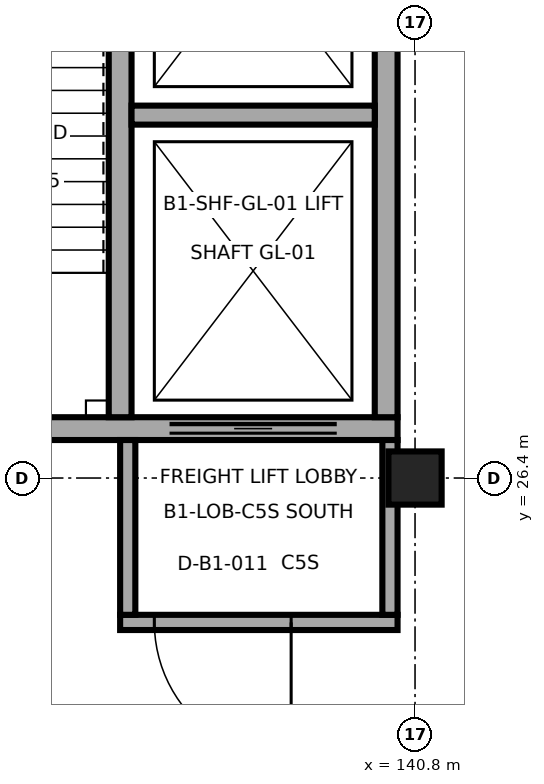
"""IFC4 building model, lengths in metres.
Left out: names, types, materials, properties, quantities, classifications, styles, units other than length and angle.
Written with IfcOpenShell. Run it as: python <this file> out.ifc"""

import sys

from ifc_helpers import new_model, si_unit, direction, frame, frame_2d, origin, origin_2d, place, context, subcontext, project, spatial, rectangle, extrude, element, fill, save


model = new_model("IFC4")
c1 = context("Model", 3, precision=1e-05, world=origin(), true_north=direction((0.0, 1.0)))
c2 = subcontext(c1, "Body", "Model", "MODEL_VIEW")
j1 = project(units=[si_unit("LENGTHUNIT", "METRE"), si_unit("PLANEANGLEUNIT", "RADIAN")], contexts=[c1])
p1 = place(None, origin())
s1 = spatial("IfcSite", under=j1, at=p1, CompositionType="ELEMENT")
p2 = place(p1, origin())
s2 = spatial("IfcBuilding", under=s1, at=p2, CompositionType="ELEMENT")
p3 = place(p2, frame((0.0, 0.0, -4.8)))
s3 = spatial("IfcBuildingStorey", under=s2, at=p3, CompositionType="ELEMENT", Elevation=-4.8)
p4 = place(p3, frame((140.8, 26.4, 0.0), z_axis=(0.0, 0.0, 1.0), x_axis=(1.0, 0.0, 0.0)))
e1 = element("IfcColumn", 1, at=p4, inside=s3, PredefinedType="COLUMN", context=c2, shape_type="SweptSolid", body=[
    extrude(rectangle(XDim=0.7, YDim=0.7, at=origin_2d()), origin(), (0.0, 0.0, 1.0), 4.8),
])
p5 = place(p3, frame((132.63, 27.05, 0.0), z_axis=(0.0, 0.0, 1.0), x_axis=(1.0, 0.0, 0.0)))
e2 = element("IfcWall", 2, at=p5, inside=s3, PredefinedType="SHEAR", context=c2, shape_type="SweptSolid", body=[
    extrude(rectangle(XDim=7.94, YDim=0.3, at=frame_2d((3.97, 0.0))), origin(), (0.0, 0.0, 1.0), 4.5),
])
p6 = place(p5, frame((4.94, 0.0, 0.0)))
e3 = element("IfcOpeningElement", 3, at=p6, cuts=e2, PredefinedType="OPENING", context=c2, shape_type="SweptSolid", body=[
    extrude(rectangle(XDim=2.2, YDim=2.6, at=frame_2d((1.1, 1.3))), frame((0.0, 0.16, 0.0), z_axis=(0.0, -1.0, 0.0), x_axis=(1.0, 0.0, 0.0)), (0.0, 0.0, 1.0), 0.32),
])
for number, where, z_axis, x_axis in (
    (4, (140.42, 27.2, 0.0), (0.0, 0.0, 1.0), (0.0, 1.0, 0.0)),
    (5, (136.92, 27.2, 0.0), (0.0, 0.0, 1.0), (0.0, 1.0, 0.0)),
):
    element("IfcWall", number, at=place(p3, frame(where, z_axis=z_axis, x_axis=x_axis)), inside=s3, PredefinedType="SHEAR", context=c2, shape_type="SweptSolid", body=[
        extrude(rectangle(XDim=8.0, YDim=0.3, at=frame_2d((4.0, 0.0))), origin(), (0.0, 0.0, 1.0), 4.5),
    ])
p7 = place(p3, frame((137.07, 31.175, 0.0), z_axis=(0.0, 0.0, 1.0), x_axis=(1.0, 0.0, 0.0)))
e6 = element("IfcWall", 6, at=p7, inside=s3, PredefinedType="SHEAR", context=c2, shape_type="SweptSolid", body=[
    extrude(rectangle(XDim=3.2, YDim=0.25, at=frame_2d((1.6, 0.0))), origin(), (0.0, 0.0, 1.0), 4.5),
])
p8 = place(p3, frame((140.57, 24.5, 0.0), z_axis=(0.0, 0.0, 1.0), x_axis=(-1.0, 0.0, 0.0)))
e7 = element("IfcWall", 7, at=p8, inside=s3, PredefinedType="SOLIDWALL", context=c2, shape_type="SweptSolid", body=[
    extrude(rectangle(XDim=3.65, YDim=0.2, at=frame_2d((1.825, 0.0))), origin(), (0.0, 0.0, 1.0), 4.485),
])
p9 = place(p8, frame((1.4, 0.0, 0.0)))
e8 = element("IfcOpeningElement", 8, at=p9, cuts=e7, PredefinedType="OPENING", context=c2, shape_type="SweptSolid", body=[
    extrude(rectangle(XDim=1.8, YDim=2.2, at=frame_2d((0.9, 1.1))), frame((0.0, 0.11, 0.0), z_axis=(0.0, -1.0, 0.0), x_axis=(1.0, 0.0, 0.0)), (0.0, 0.0, 1.0), 0.22),
])
for number, where, z_axis, x_axis in (
    (9, (137.02, 24.6, 0.0), (0.0, 0.0, 1.0), (0.0, 1.0, 0.0)),
    (10, (140.47, 26.9, 0.0), (0.0, 0.0, 1.0), (0.0, -1.0, 0.0)),
):
    element("IfcWall", number, at=place(p3, frame(where, z_axis=z_axis, x_axis=x_axis)), inside=s3, PredefinedType="SOLIDWALL", context=c2, shape_type="SweptSolid", body=[
        extrude(rectangle(XDim=2.3, YDim=0.2, at=frame_2d((1.15, 0.0))), origin(), (0.0, 0.0, 1.0), 3.932),
    ])
p10 = place(p6, origin())
e11 = element("IfcDoor", 11, at=p10, inside=s3, OperationType="SLIDING_TO_LEFT", PredefinedType="DOOR", context=c2, shape_type="SweptSolid", body=[
    extrude(rectangle(XDim=2.2, YDim=2.6, at=frame_2d((1.1, 1.3))), frame((0.0, 0.025, 0.0), z_axis=(0.0, -1.0, 0.0), x_axis=(1.0, 0.0, 0.0)), (0.0, 0.0, 1.0), 0.05),
])
fill(e3, e11)
p11 = place(p9, origin())
e12 = element("IfcDoor", 12, at=p11, inside=s3, OperationType="DOUBLE_DOOR_SINGLE_SWING", PredefinedType="DOOR", context=c2, shape_type="SweptSolid", body=[
    extrude(rectangle(XDim=1.8, YDim=2.2, at=frame_2d((0.9, 1.1))), frame((0.0, 0.025, 0.0), z_axis=(0.0, -1.0, 0.0), x_axis=(1.0, 0.0, 0.0)), (0.0, 0.0, 1.0), 0.05),
])
fill(e8, e12)
save(model, sys.argv[1])
